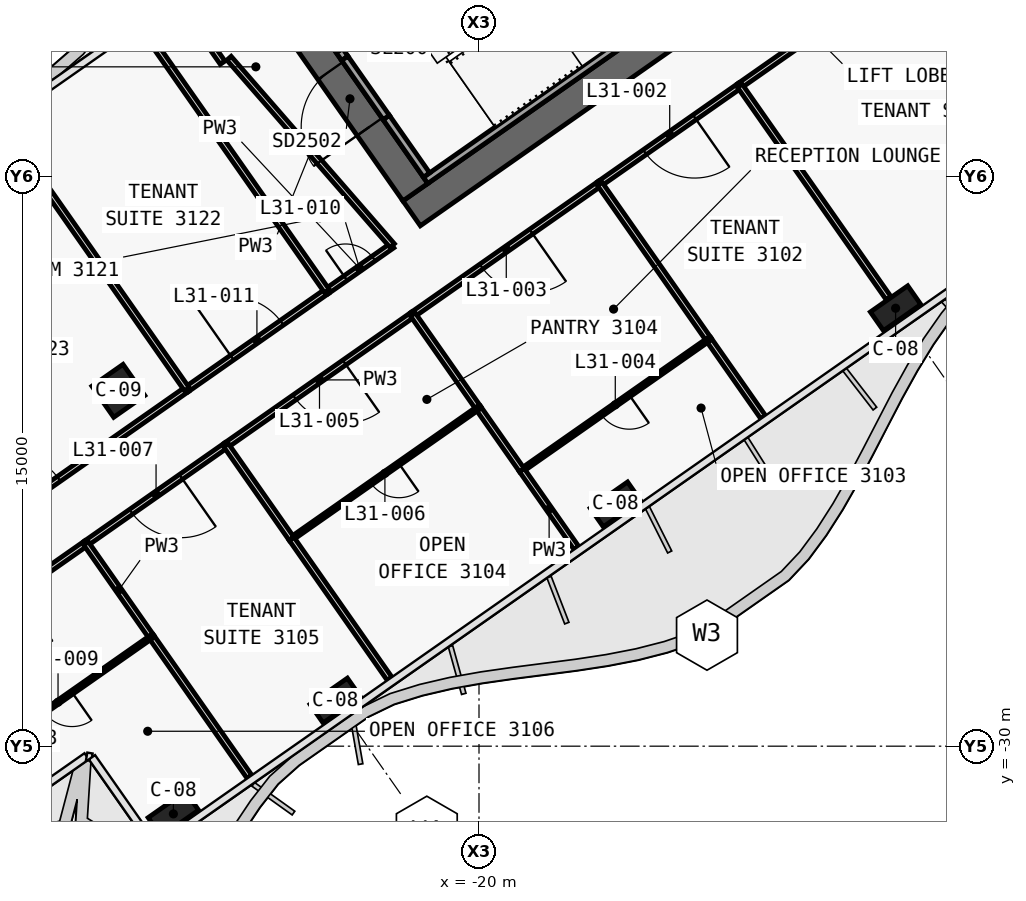
"""IFC4 building model, lengths in metres.
Left out: names, types, materials, properties, quantities, classifications, styles, units other than length and angle.
Written with IfcOpenShell. Run it as: python <this file> out.ifc"""

import sys

from ifc_helpers import new_model, si_unit, direction, frame, frame_2d, origin, origin_2d, place, context, subcontext, project, spatial, polyline, rectangle, outline, extrude, element, fill, save


model = new_model("IFC4")
c1 = context("Model", 3, precision=1e-05, world=origin(), true_north=direction((0.0, 1.0)))
c2 = subcontext(c1, "Body", "Model", "MODEL_VIEW")
j1 = project(units=[si_unit("LENGTHUNIT", "METRE"), si_unit("PLANEANGLEUNIT", "RADIAN")], contexts=[c1])
p1 = place(None, origin())
s1 = spatial("IfcSite", under=j1, at=p1, CompositionType="ELEMENT")
p2 = place(p1, origin())
s2 = spatial("IfcBuilding", under=s1, at=p2, CompositionType="ELEMENT")
p3 = place(p2, frame((0.0, 0.0, 139.8)))
s3 = spatial("IfcBuildingStorey", under=s2, at=p3, CompositionType="ELEMENT", Elevation=139.8)
p4 = place(p3, frame((0.029, -0.712, 0.0), z_axis=(0.0, 0.0, 1.0), x_axis=(-0.819151758019, -0.573576845187, 0.0)))
e1 = element("IfcWall", 1, at=p4, inside=s3, PredefinedType="SHEAR", context=c2, shape_type="SweptSolid", body=[
    extrude(outline(polyline([(26.616, 0.4), (0.56, 0.4), (-0.0, -0.4), (26.616, -0.4), (26.616, 0.4)])), origin(), (0.0, 0.0, 1.0), 3.9),
])
p5 = place(p4, frame((2.966, 0.0, 0.0)))
e2 = element("IfcOpeningElement", 2, at=p5, cuts=e1, PredefinedType="OPENING", context=c2, shape_type="SweptSolid", body=[
    extrude(rectangle(XDim=2.4, YDim=2.1, at=frame_2d((1.2, 1.05))), frame((0.0, 0.41, 0.0), z_axis=(0.0, -1.0, 0.0), x_axis=(1.0, 0.0, 0.0)), (0.0, 0.0, 1.0), 0.82),
])
p6 = place(p4, frame((11.916, 0.0, 0.0)))
e3 = element("IfcOpeningElement", 3, at=p6, cuts=e1, PredefinedType="OPENING", context=c2, shape_type="SweptSolid", body=[
    extrude(rectangle(XDim=2.4, YDim=2.1, at=frame_2d((1.2, 1.05))), frame((0.0, 0.41, 0.0), z_axis=(0.0, -1.0, 0.0), x_axis=(1.0, 0.0, 0.0)), (0.0, 0.0, 1.0), 0.82),
])
p7 = place(p3, frame((-21.675, -15.421, 0.0), z_axis=(0.0, 0.0, 1.0), x_axis=(-0.573581815061, 0.819148278049, 0.0)))
e4 = element("IfcWall", 4, at=p7, inside=s3, PredefinedType="SHEAR", context=c2, shape_type="SweptSolid", body=[
    extrude(outline(polyline([(0.0, 0.4), (0.0, -0.4), (9.6, -0.4), (9.6, 0.4), (0.0, 0.4)])), origin(), (0.0, 0.0, 1.0), 3.9),
])
p8 = place(p7, frame((6.3, 0.0, 0.0)))
e5 = element("IfcOpeningElement", 5, at=p8, cuts=e4, PredefinedType="OPENING", context=c2, shape_type="SweptSolid", body=[
    extrude(rectangle(XDim=1.8, YDim=2.1, at=frame_2d((0.9, 1.05))), frame((0.0, 0.41, 0.0), z_axis=(0.0, -1.0, 0.0), x_axis=(1.0, 0.0, 0.0)), (0.0, 0.0, 1.0), 0.82),
])
p9 = place(p7, frame((2.1, 0.0, 0.0)))
e6 = element("IfcOpeningElement", 6, at=p9, cuts=e4, PredefinedType="OPENING", context=c2, shape_type="SweptSolid", body=[
    extrude(rectangle(XDim=1.8, YDim=2.1, at=frame_2d((0.9, 1.05))), frame((0.0, 0.41, 0.0), z_axis=(0.0, -1.0, 0.0), x_axis=(1.0, 0.0, 0.0)), (0.0, 0.0, 1.0), 0.82),
])
for number, where, z_axis, x_axis in (
    (7, (-9.038, -18.475, 0.0), (0.0, 0.0, 1.0), (-0.819, -0.574, 0.0)),
    (8, (-16.41, -23.637, 0.0), (0.0, 0.0, 1.0), (-0.819, -0.574, 0.0)),
    (9, (-23.782, -28.799, 0.0), (0.0, 0.0, 1.0), (-0.819, -0.574, 0.0)),
    (10, (-28.042, -31.782, 0.0), (0.0, 0.0, 1.0), (-0.819, -0.574, 0.0)),
):
    element("IfcColumn", number, at=place(p3, frame(where, z_axis=z_axis, x_axis=x_axis)), inside=s3, PredefinedType="COLUMN", context=c2, shape_type="SweptSolid", body=[
        extrude(rectangle(XDim=1.2, YDim=0.6, at=origin_2d()), origin(), (0.0, 0.0, 1.0), 3.9),
    ])
p10 = place(p3, frame((-29.49, -20.649, 0.0), z_axis=(0.0, 0.0, 1.0), x_axis=(-0.819152044289, -0.573576436351, 0.0)))
e11 = element("IfcColumn", 11, at=p10, inside=s3, PredefinedType="COLUMN", context=c2, shape_type="SweptSolid", body=[
    extrude(rectangle(XDim=1.0, YDim=1.0, at=origin_2d()), origin(), (0.0, 0.0, 1.0), 3.9),
])
p11 = place(p3, frame((-14.851, -10.521, 0.0), z_axis=(0.0, 0.0, 1.0), x_axis=(-0.819141584393, -0.57359137434, 0.0)))
e12 = element("IfcWall", 12, at=p11, inside=s3, PredefinedType="SOLIDWALL", context=c2, shape_type="SweptSolid", body=[
    extrude(rectangle(XDim=8.0, YDim=0.2, at=frame_2d((4.0, 0.0))), origin(), (0.0, 0.0, 1.0), 3.62),
])
p12 = place(p3, frame((-21.38, -14.97, 0.0), z_axis=(0.0, 0.0, 1.0), x_axis=(-0.573559770908, 0.819163713305, 0.0)))
e13 = element("IfcWall", 13, at=p12, inside=s3, PredefinedType="SOLIDWALL", context=c2, shape_type="SweptSolid", body=[
    extrude(rectangle(XDim=1.85, YDim=0.2, at=frame_2d((0.925, 0.0))), origin(), (0.0, 0.0, 1.0), 3.62),
])
p13 = place(p3, frame((-23.531, -11.898, 0.0), z_axis=(0.0, 0.0, 1.0), x_axis=(-0.573708088123, 0.819059844958, 0.0)))
e14 = element("IfcWall", 14, at=p13, inside=s3, PredefinedType="SOLIDWALL", context=c2, shape_type="SweptSolid", body=[
    extrude(rectangle(XDim=0.6, YDim=0.2, at=frame_2d((0.3, 0.0))), origin(), (0.0, 0.0, 1.0), 3.62),
])
p14 = place(p3, frame((-22.441, -13.455, 2.15), z_axis=(0.0, 0.0, 1.0), x_axis=(-0.573591692345, 0.819141361715, 0.0)))
e15 = element("IfcWall", 15, at=p14, inside=s3, PredefinedType="SOLIDWALL", context=c2, shape_type="SweptSolid", body=[
    extrude(rectangle(XDim=1.9, YDim=0.2, at=frame_2d((0.95, 0.0))), origin(), (0.0, 0.0, 1.0), 1.47),
])
p15 = place(p3, frame((-24.002, -18.028, 0.0), z_axis=(0.0, 0.0, 1.0), x_axis=(0.819144473797, 0.573587247982, 0.0)))
e16 = element("IfcWall", 16, at=p15, inside=s3, PredefinedType="PARTITIONING", context=c2, shape_type="SweptSolid", body=[
    extrude(rectangle(XDim=2.099, YDim=0.15, at=frame_2d((1.049, 0.0))), origin(), (0.0, 0.0, 1.0), 3.0),
])
p16 = place(p15, frame((0.599, 0.0, 0.0)))
e17 = element("IfcOpeningElement", 17, at=p16, cuts=e16, PredefinedType="OPENING", context=c2, shape_type="SweptSolid", body=[
    extrude(rectangle(XDim=0.9, YDim=2.1, at=frame_2d((0.45, 1.05))), frame((0.0, 0.085, 0.0), z_axis=(0.0, -1.0, 0.0), x_axis=(1.0, 0.0, 0.0)), (0.0, 0.0, 1.0), 0.17),
])
p17 = place(p3, frame((-27.688, -20.609, 0.0), z_axis=(0.0, 0.0, 1.0), x_axis=(0.819165703328, 0.573556928727, 0.0)))
e18 = element("IfcWall", 18, at=p17, inside=s3, PredefinedType="PARTITIONING", context=c2, shape_type="SweptSolid", body=[
    extrude(rectangle(XDim=4.504, YDim=0.15, at=frame_2d((2.252, 0.0))), origin(), (0.0, 0.0, 1.0), 3.0),
])
p18 = place(p17, frame((1.452, 0.0, 0.0)))
e19 = element("IfcOpeningElement", 19, at=p18, cuts=e18, PredefinedType="OPENING", context=c2, shape_type="SweptSolid", body=[
    extrude(rectangle(XDim=1.6, YDim=2.1, at=frame_2d((0.8, 1.05))), frame((0.0, 0.085, 0.0), z_axis=(0.0, -1.0, 0.0), x_axis=(1.0, 0.0, 0.0)), (0.0, 0.0, 1.0), 0.17),
])
p19 = place(p3, frame((-35.739, -26.247, 0.0), z_axis=(0.0, 0.0, 1.0), x_axis=(0.819133916703, 0.573602324356, 0.0)))
e20 = element("IfcWall", 20, at=p19, inside=s3, PredefinedType="PARTITIONING", context=c2, shape_type="SweptSolid", body=[
    extrude(rectangle(XDim=9.832, YDim=0.15, at=frame_2d((4.916, 0.0))), origin(), (0.0, 0.0, 1.0), 3.0),
])
p20 = place(p19, frame((4.116, 0.0, 0.0)))
e21 = element("IfcOpeningElement", 21, at=p20, cuts=e20, PredefinedType="OPENING", context=c2, shape_type="SweptSolid", body=[
    extrude(rectangle(XDim=1.6, YDim=2.1, at=frame_2d((0.8, 1.05))), frame((0.0, 0.085, 0.0), z_axis=(0.0, -1.0, 0.0), x_axis=(1.0, 0.0, 0.0)), (0.0, 0.0, 1.0), 0.17),
])
p21 = place(p3, frame((-5.766, -7.456, 0.0), z_axis=(0.0, 0.0, 1.0), x_axis=(-0.81915291695, -0.57357519006, 0.0)))
e22 = element("IfcWall", 22, at=p21, inside=s3, PredefinedType="PARTITIONING", context=c2, shape_type="SweptSolid", body=[
    extrude(rectangle(XDim=9.002, YDim=0.15, at=frame_2d((4.501, 0.0))), origin(), (0.0, 0.0, 1.0), 3.0),
])
p22 = place(p21, frame((3.701, 0.0, 0.0)))
e23 = element("IfcOpeningElement", 23, at=p22, cuts=e22, PredefinedType="OPENING", context=c2, shape_type="SweptSolid", body=[
    extrude(rectangle(XDim=1.6, YDim=2.1, at=frame_2d((0.8, 1.05))), frame((0.0, 0.085, 0.0), z_axis=(0.0, -1.0, 0.0), x_axis=(1.0, 0.0, 0.0)), (0.0, 0.0, 1.0), 0.17),
])
p23 = place(p3, frame((-13.137, -12.617, 0.0), z_axis=(0.0, 0.0, 1.0), x_axis=(-0.819147870025, -0.573582397772, 0.0)))
e24 = element("IfcWall", 24, at=p23, inside=s3, PredefinedType="PARTITIONING", context=c2, shape_type="SweptSolid", body=[
    extrude(rectangle(XDim=4.504, YDim=0.15, at=frame_2d((2.252, 0.0))), origin(), (0.0, 0.0, 1.0), 3.0),
])
p24 = place(p23, frame((1.452, 0.0, 0.0)))
e25 = element("IfcOpeningElement", 25, at=p24, cuts=e24, PredefinedType="OPENING", context=c2, shape_type="SweptSolid", body=[
    extrude(rectangle(XDim=1.6, YDim=2.1, at=frame_2d((0.8, 1.05))), frame((0.0, 0.085, 0.0), z_axis=(0.0, -1.0, 0.0), x_axis=(1.0, 0.0, 0.0)), (0.0, 0.0, 1.0), 0.17),
])
p25 = place(p3, frame((-16.823, -15.198, 0.0), z_axis=(0.0, 0.0, 1.0), x_axis=(-0.819165052243, -0.573557858619, 0.0)))
e26 = element("IfcWall", 26, at=p25, inside=s3, PredefinedType="PARTITIONING", context=c2, shape_type="SweptSolid", body=[
    extrude(rectangle(XDim=6.004, YDim=0.15, at=frame_2d((3.002, 0.0))), origin(), (0.0, 0.0, 1.0), 3.0),
])
p26 = place(p25, frame((2.202, 0.0, 0.0)))
e27 = element("IfcOpeningElement", 27, at=p26, cuts=e26, PredefinedType="OPENING", context=c2, shape_type="SweptSolid", body=[
    extrude(rectangle(XDim=1.6, YDim=2.1, at=frame_2d((0.8, 1.05))), frame((0.0, 0.085, 0.0), z_axis=(0.0, -1.0, 0.0), x_axis=(1.0, 0.0, 0.0)), (0.0, 0.0, 1.0), 0.17),
])
p27 = place(p3, frame((-21.738, -18.639, 0.0), z_axis=(0.0, 0.0, 1.0), x_axis=(-0.819145946981, -0.573585144111, 0.0)))
e28 = element("IfcWall", 28, at=p27, inside=s3, PredefinedType="PARTITIONING", context=c2, shape_type="SweptSolid", body=[
    extrude(rectangle(XDim=6.004, YDim=0.15, at=frame_2d((3.002, 0.0))), origin(), (0.0, 0.0, 1.0), 3.62),
])
p28 = place(p27, frame((2.202, 0.0, 0.0)))
e29 = element("IfcOpeningElement", 29, at=p28, cuts=e28, PredefinedType="OPENING", context=c2, shape_type="SweptSolid", body=[
    extrude(rectangle(XDim=1.6, YDim=2.1, at=frame_2d((0.8, 1.05))), frame((0.0, 0.085, 0.0), z_axis=(0.0, -1.0, 0.0), x_axis=(1.0, 0.0, 0.0)), (0.0, 0.0, 1.0), 0.17),
])
p29 = place(p3, frame((-26.653, -22.081, 0.0), z_axis=(0.0, 0.0, 1.0), x_axis=(-0.819140235121, -0.573593301221, 0.0)))
e30 = element("IfcWall", 30, at=p29, inside=s3, PredefinedType="PARTITIONING", context=c2, shape_type="SweptSolid", body=[
    extrude(rectangle(XDim=4.504, YDim=0.15, at=frame_2d((2.252, 0.0))), origin(), (0.0, 0.0, 1.0), 3.0),
])
p30 = place(p29, frame((1.452, 0.0, 0.0)))
e31 = element("IfcOpeningElement", 31, at=p30, cuts=e30, PredefinedType="OPENING", context=c2, shape_type="SweptSolid", body=[
    extrude(rectangle(XDim=1.6, YDim=2.1, at=frame_2d((0.8, 1.05))), frame((0.0, 0.085, 0.0), z_axis=(0.0, -1.0, 0.0), x_axis=(1.0, 0.0, 0.0)), (0.0, 0.0, 1.0), 0.17),
])
p31 = place(p3, frame((-30.339, -24.662, 0.0), z_axis=(0.0, 0.0, 1.0), x_axis=(-0.819166940189, -0.573555162214, 0.0)))
e32 = element("IfcWall", 32, at=p31, inside=s3, PredefinedType="PARTITIONING", context=c2, shape_type="SweptSolid", body=[
    extrude(rectangle(XDim=6.002, YDim=0.15, at=frame_2d((3.001, 0.0))), origin(), (0.0, 0.0, 1.0), 2.9),
])
p32 = place(p31, frame((2.201, 0.0, 0.0)))
e33 = element("IfcOpeningElement", 33, at=p32, cuts=e32, PredefinedType="OPENING", context=c2, shape_type="SweptSolid", body=[
    extrude(rectangle(XDim=1.6, YDim=2.1, at=frame_2d((0.8, 1.05))), frame((0.0, 0.085, 0.0), z_axis=(0.0, -1.0, 0.0), x_axis=(1.0, 0.0, 0.0)), (0.0, 0.0, 1.0), 0.17),
])
p33 = place(p3, frame((-26.746, -12.014, 0.0), z_axis=(0.0, 0.0, 1.0), x_axis=(-0.573568836472, 0.819157365729, 0.0)))
e34 = element("IfcWall", 34, at=p33, inside=s3, PredefinedType="PARTITIONING", context=c2, shape_type="SweptSolid", body=[
    extrude(rectangle(XDim=2.0, YDim=0.15, at=frame_2d((1.0, 0.0))), origin(), (0.0, 0.0, 1.0), 3.0),
])
p34 = place(p3, frame((-22.284, -16.826, 0.0), z_axis=(0.0, 0.0, 1.0), x_axis=(-0.656758142177, 0.754101281449, 0.0)))
e35 = element("IfcWall", 35, at=p34, inside=s3, PredefinedType="PARTITIONING", context=c2, shape_type="SweptSolid", body=[
    extrude(rectangle(XDim=6.539, YDim=0.15, at=frame_2d((3.269, 0.0))), origin(), (0.0, 0.0, 1.0), 3.0),
])
p35 = place(p3, frame((-24.001, -18.026, 0.0), z_axis=(0.0, 0.0, 1.0), x_axis=(-0.573591492816, 0.819141501433, 0.0)))
e36 = element("IfcWall", 36, at=p35, inside=s3, PredefinedType="PARTITIONING", context=c2, shape_type="SweptSolid", body=[
    extrude(rectangle(XDim=8.5, YDim=0.15, at=frame_2d((4.25, 0.0))), origin(), (0.0, 0.0, 1.0), 3.0),
])
p36 = place(p3, frame((-27.687, -20.607, 0.0), z_axis=(0.0, 0.0, 1.0), x_axis=(-0.573572219642, 0.819154996844, 0.0)))
e37 = element("IfcWall", 37, at=p36, inside=s3, PredefinedType="PARTITIONING", context=c2, shape_type="SweptSolid", body=[
    extrude(rectangle(XDim=8.5, YDim=0.15, at=frame_2d((4.25, 0.0))), origin(), (0.0, 0.0, 1.0), 3.0),
])
p37 = place(p3, frame((-9.221, -18.213, 0.0), z_axis=(0.0, 0.0, 1.0), x_axis=(-0.573560698343, 0.819163063936, 0.0)))
e38 = element("IfcWall", 38, at=p37, inside=s3, PredefinedType="PARTITIONING", context=c2, shape_type="SweptSolid", body=[
    extrude(rectangle(XDim=6.83, YDim=0.15, at=frame_2d((3.415, 0.0))), origin(), (0.0, 0.0, 1.0), 3.0),
])
p38 = place(p3, frame((-12.523, -21.343, 0.0), z_axis=(0.0, 0.0, 1.0), x_axis=(-0.573501652684, 0.819204403289, 0.0)))
e39 = element("IfcWall", 39, at=p38, inside=s3, PredefinedType="PARTITIONING", context=c2, shape_type="SweptSolid", body=[
    extrude(rectangle(XDim=2.501, YDim=0.15, at=frame_2d((1.25, 0.0))), origin(), (0.0, 0.0, 1.0), 2.9),
])
p39 = place(p3, frame((-13.956, -19.296, 0.0), z_axis=(0.0, 0.0, 1.0), x_axis=(-0.573613022702, 0.819126425033, 0.0)))
e40 = element("IfcWall", 40, at=p39, inside=s3, PredefinedType="PARTITIONING", context=c2, shape_type="SweptSolid", body=[
    extrude(rectangle(XDim=5.002, YDim=0.15, at=frame_2d((2.501, 0.0))), origin(), (0.0, 0.0, 1.0), 3.62),
])
p40 = place(p3, frame((-13.957, -19.296, 0.0), z_axis=(0.0, 0.0, 1.0), x_axis=(-0.819149710902, -0.573579768758, 0.0)))
e41 = element("IfcWall", 41, at=p40, inside=s3, PredefinedType="PARTITIONING", context=c2, shape_type="SweptSolid", body=[
    extrude(rectangle(XDim=6.0, YDim=0.1, at=frame_2d((3.0, 0.0))), origin(), (0.0, 0.0, 1.0), 3.0),
])
p41 = place(p40, frame((2.55, 0.0, 0.0)))
e42 = element("IfcOpeningElement", 42, at=p41, cuts=e41, PredefinedType="OPENING", context=c2, shape_type="SweptSolid", body=[
    extrude(rectangle(XDim=0.9, YDim=2.1, at=frame_2d((0.45, 1.05))), frame((0.0, 0.06, 0.0), z_axis=(0.0, -1.0, 0.0), x_axis=(1.0, 0.0, 0.0)), (0.0, 0.0, 1.0), 0.12),
])
p42 = place(p3, frame((-17.438, -24.784, 0.0), z_axis=(0.0, 0.0, 1.0), x_axis=(-0.573560689761, 0.819163069945, 0.0)))
e43 = element("IfcWall", 43, at=p42, inside=s3, PredefinedType="PARTITIONING", context=c2, shape_type="SweptSolid", body=[
    extrude(rectangle(XDim=2.499, YDim=0.15, at=frame_2d((1.25, 0.0))), origin(), (0.0, 0.0, 1.0), 2.9),
])
p43 = place(p3, frame((-18.872, -22.736, 0.0), z_axis=(0.0, 0.0, 1.0), x_axis=(-0.573642464246, 0.819105807093, 0.0)))
e44 = element("IfcWall", 44, at=p43, inside=s3, PredefinedType="PARTITIONING", context=c2, shape_type="SweptSolid", body=[
    extrude(rectangle(XDim=2.001, YDim=0.15, at=frame_2d((1.0, 0.0))), origin(), (0.0, 0.0, 1.0), 3.62),
])
p44 = place(p3, frame((-20.018, -21.1, 0.0), z_axis=(0.0, 0.0, 1.0), x_axis=(-0.573604249862, 0.819132568355, 0.0)))
e45 = element("IfcWall", 45, at=p44, inside=s3, PredefinedType="PARTITIONING", context=c2, shape_type="SweptSolid", body=[
    extrude(rectangle(XDim=3.002, YDim=0.15, at=frame_2d((1.501, 0.0))), origin(), (0.0, 0.0, 1.0), 3.62),
])
p45 = place(p3, frame((-20.019, -21.099, 0.0), z_axis=(0.0, 0.0, 1.0), x_axis=(-0.819149710902, -0.573579768758, 0.0)))
e46 = element("IfcWall", 46, at=p45, inside=s3, PredefinedType="PARTITIONING", context=c2, shape_type="SweptSolid", body=[
    extrude(rectangle(XDim=6.0, YDim=0.1, at=frame_2d((3.0, 0.0))), origin(), (0.0, 0.0, 1.0), 3.62),
])
p46 = place(p45, frame((2.55, 0.0, 0.0)))
e47 = element("IfcOpeningElement", 47, at=p46, cuts=e46, PredefinedType="OPENING", context=c2, shape_type="SweptSolid", body=[
    extrude(rectangle(XDim=0.9, YDim=2.1, at=frame_2d((0.45, 1.05))), frame((0.0, 0.06, 0.0), z_axis=(0.0, -1.0, 0.0), x_axis=(1.0, 0.0, 0.0)), (0.0, 0.0, 1.0), 0.12),
])
p47 = place(p3, frame((-22.353, -28.226, 0.0), z_axis=(0.0, 0.0, 1.0), x_axis=(-0.573589807488, 0.819142681555, 0.0)))
e48 = element("IfcWall", 48, at=p47, inside=s3, PredefinedType="PARTITIONING", context=c2, shape_type="SweptSolid", body=[
    extrude(rectangle(XDim=4.499, YDim=0.15, at=frame_2d((2.25, 0.0))), origin(), (0.0, 0.0, 1.0), 2.9),
])
p48 = place(p3, frame((-24.934, -24.54, 0.0), z_axis=(0.0, 0.0, 1.0), x_axis=(-0.573560650686, 0.819163097304, 0.0)))
e49 = element("IfcWall", 49, at=p48, inside=s3, PredefinedType="PARTITIONING", context=c2, shape_type="SweptSolid", body=[
    extrude(rectangle(XDim=3.0, YDim=0.15, at=frame_2d((1.5, 0.0))), origin(), (0.0, 0.0, 1.0), 3.62),
])
p49 = place(p3, frame((-26.039, -30.807, 0.0), z_axis=(0.0, 0.0, 1.0), x_axis=(-0.573593387921, 0.81914017441, 0.0)))
e50 = element("IfcWall", 50, at=p49, inside=s3, PredefinedType="PARTITIONING", context=c2, shape_type="SweptSolid", body=[
    extrude(rectangle(XDim=4.501, YDim=0.15, at=frame_2d((2.25, 0.0))), origin(), (0.0, 0.0, 1.0), 2.9),
])
p50 = place(p3, frame((-28.619, -27.122, 0.0), z_axis=(0.0, 0.0, 1.0), x_axis=(-0.57356603932, 0.81915932427, 0.0)))
e51 = element("IfcWall", 51, at=p50, inside=s3, PredefinedType="PARTITIONING", context=c2, shape_type="SweptSolid", body=[
    extrude(rectangle(XDim=3.002, YDim=0.15, at=frame_2d((1.501, 0.0))), origin(), (0.0, 0.0, 1.0), 3.62),
])
p51 = place(p3, frame((-28.62, -27.121, 0.0), z_axis=(0.0, 0.0, 1.0), x_axis=(-0.819149710902, -0.573579768758, 0.0)))
e52 = element("IfcWall", 52, at=p51, inside=s3, PredefinedType="PARTITIONING", context=c2, shape_type="SweptSolid", body=[
    extrude(rectangle(XDim=6.0, YDim=0.1, at=frame_2d((3.0, 0.0))), origin(), (0.0, 0.0, 1.0), 2.9),
])
p52 = place(p51, frame((2.55, 0.0, 0.0)))
e53 = element("IfcOpeningElement", 53, at=p52, cuts=e52, PredefinedType="OPENING", context=c2, shape_type="SweptSolid", body=[
    extrude(rectangle(XDim=0.9, YDim=2.1, at=frame_2d((0.45, 1.05))), frame((0.0, 0.06, 0.0), z_axis=(0.0, -1.0, 0.0), x_axis=(1.0, 0.0, 0.0)), (0.0, 0.0, 1.0), 0.12),
])
p53 = place(p9, origin())
e54 = element("IfcDoor", 54, at=p53, inside=s3, OperationType="DOUBLE_DOOR_SINGLE_SWING", PredefinedType="DOOR", context=c2, shape_type="SweptSolid", body=[
    extrude(rectangle(XDim=1.8, YDim=2.1, at=frame_2d((0.9, 1.05))), frame((0.0, 0.025, 0.0), z_axis=(0.0, -1.0, 0.0), x_axis=(1.0, 0.0, 0.0)), (0.0, 0.0, 1.0), 0.05),
])
fill(e6, e54)
p54 = place(p24, origin())
e55 = element("IfcDoor", 55, at=p54, inside=s3, OperationType="DOUBLE_DOOR_SINGLE_SWING", PredefinedType="DOOR", context=c2, shape_type="SweptSolid", body=[
    extrude(rectangle(XDim=1.6, YDim=2.1, at=frame_2d((0.8, 1.05))), frame((0.0, 0.025, 0.0), z_axis=(0.0, -1.0, 0.0), x_axis=(1.0, 0.0, 0.0)), (0.0, 0.0, 1.0), 0.05),
])
fill(e25, e55)
p55 = place(p26, origin())
e56 = element("IfcDoor", 56, at=p55, inside=s3, OperationType="DOUBLE_DOOR_SINGLE_SWING", PredefinedType="DOOR", context=c2, shape_type="SweptSolid", body=[
    extrude(rectangle(XDim=1.6, YDim=2.1, at=frame_2d((0.8, 1.05))), frame((0.0, 0.025, 0.0), z_axis=(0.0, -1.0, 0.0), x_axis=(1.0, 0.0, 0.0)), (0.0, 0.0, 1.0), 0.05),
])
fill(e27, e56)
p56 = place(p41, origin())
e57 = element("IfcDoor", 57, at=p56, inside=s3, OperationType="SINGLE_SWING_RIGHT", PredefinedType="DOOR", context=c2, shape_type="SweptSolid", body=[
    extrude(rectangle(XDim=0.9, YDim=2.1, at=frame_2d((0.45, 1.05))), frame((0.0, 0.025, 0.0), z_axis=(0.0, -1.0, 0.0), x_axis=(1.0, 0.0, 0.0)), (0.0, 0.0, 1.0), 0.05),
])
fill(e42, e57)
p57 = place(p28, origin())
e58 = element("IfcDoor", 58, at=p57, inside=s3, OperationType="DOUBLE_DOOR_SINGLE_SWING", PredefinedType="DOOR", context=c2, shape_type="SweptSolid", body=[
    extrude(rectangle(XDim=1.6, YDim=2.1, at=frame_2d((0.8, 1.05))), frame((0.0, 0.025, 0.0), z_axis=(0.0, -1.0, 0.0), x_axis=(1.0, 0.0, 0.0)), (0.0, 0.0, 1.0), 0.05),
])
fill(e29, e58)
p58 = place(p46, origin())
e59 = element("IfcDoor", 59, at=p58, inside=s3, OperationType="SINGLE_SWING_RIGHT", PredefinedType="DOOR", context=c2, shape_type="SweptSolid", body=[
    extrude(rectangle(XDim=0.9, YDim=2.1, at=frame_2d((0.45, 1.05))), frame((0.0, 0.025, 0.0), z_axis=(0.0, -1.0, 0.0), x_axis=(1.0, 0.0, 0.0)), (0.0, 0.0, 1.0), 0.05),
])
fill(e47, e59)
p59 = place(p30, origin())
e60 = element("IfcDoor", 60, at=p59, inside=s3, OperationType="DOUBLE_DOOR_SINGLE_SWING", PredefinedType="DOOR", context=c2, shape_type="SweptSolid", body=[
    extrude(rectangle(XDim=1.6, YDim=2.1, at=frame_2d((0.8, 1.05))), frame((0.0, 0.025, 0.0), z_axis=(0.0, -1.0, 0.0), x_axis=(1.0, 0.0, 0.0)), (0.0, 0.0, 1.0), 0.05),
])
fill(e31, e60)
p60 = place(p52, origin())
e61 = element("IfcDoor", 61, at=p60, inside=s3, OperationType="SINGLE_SWING_LEFT", PredefinedType="DOOR", context=c2, shape_type="SweptSolid", body=[
    extrude(rectangle(XDim=0.9, YDim=2.1, at=frame_2d((0.45, 1.05))), frame((0.0, 0.025, 0.0), z_axis=(0.0, -1.0, 0.0), x_axis=(1.0, 0.0, 0.0)), (0.0, 0.0, 1.0), 0.05),
])
fill(e53, e61)
p61 = place(p16, origin())
e62 = element("IfcDoor", 62, at=p61, inside=s3, OperationType="SINGLE_SWING_RIGHT", PredefinedType="DOOR", context=c2, shape_type="SweptSolid", body=[
    extrude(rectangle(XDim=0.9, YDim=2.1, at=frame_2d((0.45, 1.05))), frame((0.0, 0.025, 0.0), z_axis=(0.0, -1.0, 0.0), x_axis=(1.0, 0.0, 0.0)), (0.0, 0.0, 1.0), 0.05),
])
fill(e17, e62)
p62 = place(p18, origin())
e63 = element("IfcDoor", 63, at=p62, inside=s3, OperationType="DOUBLE_DOOR_SINGLE_SWING", PredefinedType="DOOR", context=c2, shape_type="SweptSolid", body=[
    extrude(rectangle(XDim=1.6, YDim=2.1, at=frame_2d((0.8, 1.05))), frame((0.0, 0.025, 0.0), z_axis=(0.0, -1.0, 0.0), x_axis=(1.0, 0.0, 0.0)), (0.0, 0.0, 1.0), 0.05),
])
fill(e19, e63)
p63 = place(p20, origin())
e64 = element("IfcDoor", 64, at=p63, inside=s3, OperationType="DOUBLE_DOOR_SINGLE_SWING", PredefinedType="DOOR", context=c2, shape_type="SweptSolid", body=[
    extrude(rectangle(XDim=1.6, YDim=2.1, at=frame_2d((0.8, 1.05))), frame((0.0, 0.025, 0.0), z_axis=(0.0, -1.0, 0.0), x_axis=(1.0, 0.0, 0.0)), (0.0, 0.0, 1.0), 0.05),
])
fill(e21, e64)
save(model, sys.argv[1])
